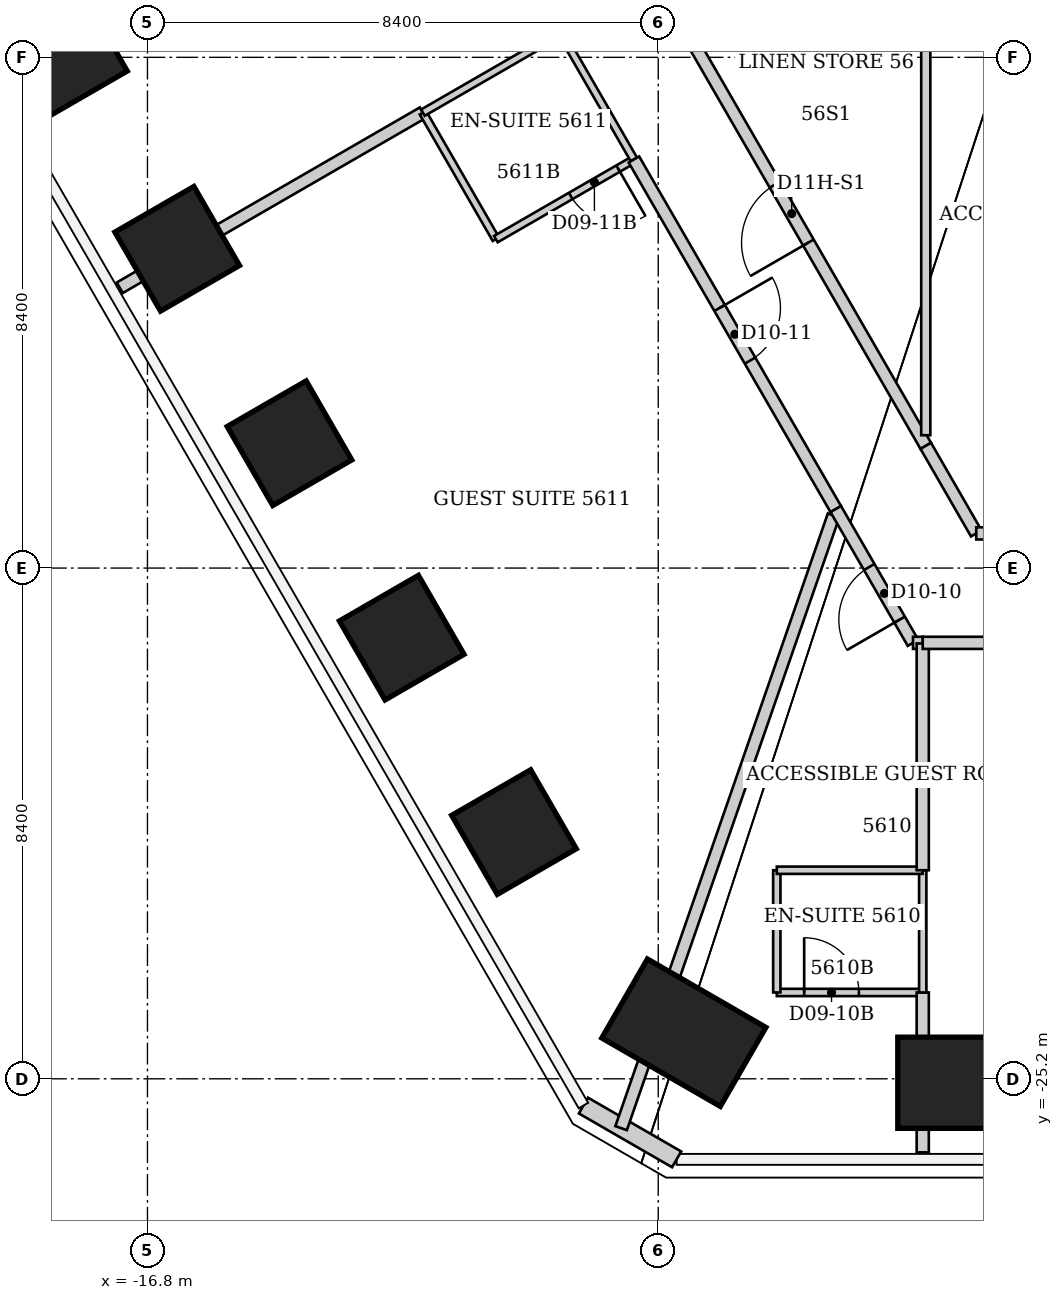
"""IFC4 building model, lengths in metres.
Left out: names, types, materials, properties, quantities, classifications, styles, units other than length and angle.
Written with IfcOpenShell. Run it as: python <this file> out.ifc"""

import sys

from ifc_helpers import new_model, si_unit, direction, frame, frame_2d, origin, origin_2d, place, context, subcontext, project, spatial, rectangle, extrude, element, fill, save


model = new_model("IFC4")
c1 = context("Model", 3, precision=1e-05, world=origin(), true_north=direction((0.0, 1.0)))
c2 = subcontext(c1, "Body", "Model", "MODEL_VIEW")
j1 = project(units=[si_unit("LENGTHUNIT", "METRE"), si_unit("PLANEANGLEUNIT", "RADIAN")], contexts=[c1])
p1 = place(None, origin())
s1 = spatial("IfcSite", under=j1, at=p1, CompositionType="ELEMENT")
p2 = place(p1, origin())
s2 = spatial("IfcBuilding", under=s1, at=p2, CompositionType="ELEMENT")
p3 = place(p2, frame((0.0, 0.0, 225.0)))
s3 = spatial("IfcBuildingStorey", under=s2, at=p3, CompositionType="ELEMENT", Elevation=225.0)
p4 = place(p3, frame((-3.71, -25.265, 0.0), z_axis=(0.0, 0.0, 1.0), x_axis=(0.0, -1.0, 0.0)))
e1 = element("IfcColumn", 1, at=p4, inside=s3, PredefinedType="COLUMN", context=c2, shape_type="SweptSolid", body=[
    extrude(rectangle(XDim=1.5, YDim=1.5, at=origin_2d()), origin(), (0.0, 0.0, 1.0), 3.8),
])
p5 = place(p3, frame((-7.979, -24.442, 0.0), z_axis=(0.0, 0.0, 1.0), x_axis=(-0.5, -0.866025403784, 0.0)))
e2 = element("IfcColumn", 2, at=p5, inside=s3, PredefinedType="COLUMN", context=c2, shape_type="SweptSolid", body=[
    extrude(rectangle(XDim=1.5, YDim=2.25, at=origin_2d()), origin(), (0.0, 0.0, 1.0), 3.8),
])
for number, where, z_axis, x_axis in (
    (3, (-10.772, -21.142, 0.0), (0.0, 0.0, 1.0), (-0.866, -0.5, 0.0)),
    (4, (-12.618, -17.945, 0.0), (0.0, 0.0, 1.0), (-0.866, -0.5, 0.0)),
    (5, (-14.465, -14.747, 0.0), (0.0, 0.0, 1.0), (-0.866, -0.5, 0.0)),
    (6, (-16.311, -11.549, 0.0), (0.0, 0.0, 1.0), (-0.866, -0.5, 0.0)),
    (7, (-18.157, -8.351, 0.0), (0.0, 0.0, 1.0), (-0.866, -0.5, 0.0)),
):
    element("IfcColumn", number, at=place(p3, frame(where, z_axis=z_axis, x_axis=x_axis)), inside=s3, PredefinedType="COLUMN", context=c2, shape_type="SweptSolid", body=[
        extrude(rectangle(XDim=1.5, YDim=1.5, at=origin_2d()), origin(), (0.0, 0.0, 1.0), 3.8),
    ])
p6 = place(p3, frame((-8.097, -26.525, 0.0), z_axis=(0.0, 0.0, 1.0), x_axis=(-0.866036293601, 0.499981137809, 0.0)))
e8 = element("IfcWall", 8, at=p6, inside=s3, PredefinedType="SOLIDWALL", context=c2, shape_type="SweptSolid", body=[
    extrude(rectangle(XDim=1.77, YDim=0.3, at=frame_2d((0.885, 0.0))), origin(), (0.0, 0.0, 1.0), 3.64),
])
p7 = place(p3, frame((-17.256, -12.19, 0.0), z_axis=(0.0, 0.0, 1.0), x_axis=(0.865937714159, 0.500151852138, 0.0)))
e9 = element("IfcWall", 9, at=p7, inside=s3, PredefinedType="PARTITIONING", context=c2, shape_type="SweptSolid", body=[
    extrude(rectangle(XDim=5.758, YDim=0.2, at=frame_2d((2.879, 0.0))), origin(), (0.0, 0.0, 1.0), 3.038),
])
p8 = place(p3, frame((-12.27, -9.31, 0.0), z_axis=(0.0, 0.0, 1.0), x_axis=(0.499737123639, -0.866177122335, 0.0)))
e10 = element("IfcWall", 10, at=p8, inside=s3, PredefinedType="PARTITIONING", context=c2, shape_type="SweptSolid", body=[
    extrude(rectangle(XDim=2.401, YDim=0.12, at=frame_2d((1.201, 0.0))), origin(), (0.0, 0.0, 1.0), 3.64),
])
p9 = place(p3, frame((-12.27, -9.31, 0.0), z_axis=(0.0, 0.0, 1.0), x_axis=(0.866114241029, 0.499846097802, 0.0)))
e11 = element("IfcWall", 11, at=p9, inside=s3, PredefinedType="PARTITIONING", context=c2, shape_type="SweptSolid", body=[
    extrude(rectangle(XDim=2.621, YDim=0.12, at=frame_2d((1.311, 0.0))), origin(), (0.0, 0.0, 1.0), 3.038),
])
p10 = place(p3, frame((-11.07, -11.39, 0.0), z_axis=(0.0, 0.0, 1.0), x_axis=(0.866154567199, 0.49977621564, 0.0)))
e12 = element("IfcWall", 12, at=p10, inside=s3, PredefinedType="PARTITIONING", context=c2, shape_type="SweptSolid", body=[
    extrude(rectangle(XDim=2.621, YDim=0.12, at=frame_2d((1.311, 0.0))), origin(), (0.0, 0.0, 1.0), 3.64),
])
p11 = place(p10, frame((1.421, 0.0, 0.0)))
e13 = element("IfcOpeningElement", 13, at=p11, cuts=e12, PredefinedType="OPENING", context=c2, shape_type="SweptSolid", body=[
    extrude(rectangle(XDim=0.9, YDim=2.03, at=frame_2d((0.45, 1.015))), frame((0.0, 0.06, 0.0), z_axis=(0.0, -1.0, 0.0), x_axis=(1.0, 0.0, 0.0)), (0.0, 0.0, 1.0), 0.12),
])
p12 = place(p3, frame((-10.0, -8.0, 0.0), z_axis=(0.0, 0.0, 1.0), x_axis=(0.499693115345, -0.866202511239, 0.0)))
e14 = element("IfcWall", 14, at=p12, inside=s3, PredefinedType="PARTITIONING", context=c2, shape_type="SweptSolid", body=[
    extrude(rectangle(XDim=2.401, YDim=0.12, at=frame_2d((1.201, 0.0))), origin(), (0.0, 0.0, 1.0), 3.64),
])
p13 = place(p3, frame((-9.01, -26.012, 0.0), z_axis=(0.0, 0.0, 1.0), x_axis=(0.327582991606, 0.944822408504, 0.0)))
e15 = element("IfcWall", 15, at=p13, inside=s3, PredefinedType="PARTITIONING", context=c2, shape_type="SweptSolid", body=[
    extrude(rectangle(XDim=10.667, YDim=0.2, at=frame_2d((5.333, 0.0))), origin(), (0.0, 0.0, 1.0), 3.64),
])
p14 = place(p3, frame((-8.8, -10.08, 0.0), z_axis=(0.0, 0.0, 1.0), x_axis=(0.500034373799, -0.866005557153, 0.0)))
e16 = element("IfcWall", 16, at=p14, inside=s3, PredefinedType="PARTITIONING", context=c2, shape_type="SweptSolid", body=[
    extrude(rectangle(XDim=6.64, YDim=0.2, at=frame_2d((3.32, 0.0))), origin(), (0.0, 0.0, 1.0), 3.64),
])
p15 = place(p14, frame((2.82, 0.0, 0.0)))
e17 = element("IfcOpeningElement", 17, at=p15, cuts=e16, PredefinedType="OPENING", context=c2, shape_type="SweptSolid", body=[
    extrude(rectangle(XDim=1.0, YDim=2.13, at=frame_2d((0.5, 1.065))), frame((0.0, 0.1, 0.0), z_axis=(0.0, -1.0, 0.0), x_axis=(1.0, 0.0, 0.0)), (0.0, 0.0, 1.0), 0.2),
])
p16 = place(p3, frame((-6.45, -23.78, 0.0), z_axis=(0.0, 0.0, 1.0), x_axis=(1.0, 0.0, 0.0)))
e18 = element("IfcWall", 18, at=p16, inside=s3, PredefinedType="PARTITIONING", context=c2, shape_type="SweptSolid", body=[
    extrude(rectangle(XDim=2.4, YDim=0.12, at=frame_2d((1.2, 0.0))), origin(), (0.0, 0.0, 1.0), 3.64),
])
p17 = place(p16, frame((0.45, 0.0, 0.0)))
e19 = element("IfcOpeningElement", 19, at=p17, cuts=e18, PredefinedType="OPENING", context=c2, shape_type="SweptSolid", body=[
    extrude(rectangle(XDim=0.9, YDim=2.03, at=frame_2d((0.45, 1.015))), frame((0.0, 0.06, 0.0), z_axis=(0.0, -1.0, 0.0), x_axis=(1.0, 0.0, 0.0)), (0.0, 0.0, 1.0), 0.12),
])
p18 = place(p3, frame((-6.45, -21.77, 0.0), z_axis=(0.0, 0.0, 1.0), x_axis=(0.0, -1.0, 0.0)))
e20 = element("IfcWall", 20, at=p18, inside=s3, PredefinedType="PARTITIONING", context=c2, shape_type="SweptSolid", body=[
    extrude(rectangle(XDim=2.01, YDim=0.12, at=frame_2d((1.005, 0.0))), origin(), (0.0, 0.0, 1.0), 3.64),
])
p19 = place(p3, frame((-5.48, -15.83, 0.0), z_axis=(0.0, 0.0, 1.0), x_axis=(0.499963722229, -0.866046347752, 0.0)))
e21 = element("IfcWall", 21, at=p19, inside=s3, PredefinedType="PARTITIONING", context=c2, shape_type="SweptSolid", body=[
    extrude(rectangle(XDim=2.54, YDim=0.2, at=frame_2d((1.27, 0.0))), origin(), (0.0, 0.0, 1.0), 3.64),
])
p20 = place(p19, frame((1.1, 0.0, 0.0)))
e22 = element("IfcOpeningElement", 22, at=p20, cuts=e21, PredefinedType="OPENING", context=c2, shape_type="SweptSolid", body=[
    extrude(rectangle(XDim=1.0, YDim=2.13, at=frame_2d((0.5, 1.065))), frame((0.0, 0.1, 0.0), z_axis=(0.0, -1.0, 0.0), x_axis=(1.0, 0.0, 0.0)), (0.0, 0.0, 1.0), 0.2),
])
p21 = place(p3, frame((-4.21, -18.03, 0.0), z_axis=(0.0, 0.0, 1.0), x_axis=(1.0, 0.0, 0.0)))
e23 = element("IfcWall", 23, at=p21, inside=s3, PredefinedType="PARTITIONING", context=c2, shape_type="SweptSolid", body=[
    extrude(rectangle(XDim=0.16, YDim=0.2, at=frame_2d((0.08, 0.0))), origin(), (0.0, 0.0, 1.0), 3.64),
])
p22 = place(p3, frame((-4.05, -26.41, 0.0), z_axis=(0.0, 0.0, 1.0), x_axis=(0.0, 1.0, 0.0)))
e24 = element("IfcWall", 24, at=p22, inside=s3, PredefinedType="PARTITIONING", context=c2, shape_type="SweptSolid", body=[
    extrude(rectangle(XDim=2.63, YDim=0.2, at=frame_2d((1.315, 0.0))), origin(), (0.0, 0.0, 1.0), 3.64),
])
p23 = place(p3, frame((-4.05, -23.78, 0.0), z_axis=(0.0, 0.0, 1.0), x_axis=(0.0, 1.0, 0.0)))
e25 = element("IfcWall", 25, at=p23, inside=s3, PredefinedType="PARTITIONING", context=c2, shape_type="SweptSolid", body=[
    extrude(rectangle(XDim=2.01, YDim=0.12, at=frame_2d((1.005, 0.0))), origin(), (0.0, 0.0, 1.0), 3.64),
])
p24 = place(p3, frame((-4.05, -21.77, 0.0), z_axis=(0.0, 0.0, 1.0), x_axis=(-1.0, 0.0, 0.0)))
e26 = element("IfcWall", 26, at=p24, inside=s3, PredefinedType="PARTITIONING", context=c2, shape_type="SweptSolid", body=[
    extrude(rectangle(XDim=2.4, YDim=0.12, at=frame_2d((1.2, 0.0))), origin(), (0.0, 0.0, 1.0), 3.64),
])
p25 = place(p3, frame((-4.05, -21.77, 0.0), z_axis=(0.0, 0.0, 1.0), x_axis=(0.0, 1.0, 0.0)))
e27 = element("IfcWall", 27, at=p25, inside=s3, PredefinedType="PARTITIONING", context=c2, shape_type="SweptSolid", body=[
    extrude(rectangle(XDim=3.73, YDim=0.2, at=frame_2d((1.865, 0.0))), origin(), (0.0, 0.0, 1.0), 3.64),
])
p26 = place(p3, frame((-4.05, -18.03, 0.0), z_axis=(0.0, 0.0, 1.0), x_axis=(1.0, 0.0, 0.0)))
e28 = element("IfcWall", 28, at=p26, inside=s3, PredefinedType="PARTITIONING", context=c2, shape_type="SweptSolid", body=[
    extrude(rectangle(XDim=8.26, YDim=0.2, at=frame_2d((4.13, 0.0))), origin(), (0.0, 0.0, 1.0), 3.64),
])
p27 = place(p26, frame((3.63, 0.0, 0.0)))
e29 = element("IfcOpeningElement", 29, at=p27, cuts=e28, PredefinedType="OPENING", context=c2, shape_type="SweptSolid", body=[
    extrude(rectangle(XDim=1.0, YDim=2.13, at=frame_2d((0.5, 1.065))), frame((0.0, 0.1, 0.0), z_axis=(0.0, -1.0, 0.0), x_axis=(1.0, 0.0, 0.0)), (0.0, 0.0, 1.0), 0.2),
])
p28 = place(p3, frame((-4.0, -14.79, 0.0), z_axis=(0.0, 0.0, 1.0), x_axis=(-0.499916512745, 0.866073599808, 0.0)))
e30 = element("IfcWall", 30, at=p28, inside=s3, PredefinedType="PARTITIONING", context=c2, shape_type="SweptSolid", body=[
    extrude(rectangle(XDim=8.821, YDim=0.2, at=frame_2d((4.411, 0.0))), origin(), (0.0, 0.0, 1.0), 3.64),
])
p29 = place(p28, frame((3.861, 0.0, 0.0)))
e31 = element("IfcOpeningElement", 31, at=p29, cuts=e30, PredefinedType="OPENING", context=c2, shape_type="SweptSolid", body=[
    extrude(rectangle(XDim=1.1, YDim=2.2, at=frame_2d((0.55, 1.1))), frame((0.0, 0.1, 0.0), z_axis=(0.0, -1.0, 0.0), x_axis=(1.0, 0.0, 0.0)), (0.0, 0.0, 1.0), 0.2),
])
p30 = place(p3, frame((-4.0, -7.1, 0.0), z_axis=(0.0, 0.0, 1.0), x_axis=(0.0, -1.0, 0.0)))
e32 = element("IfcWall", 32, at=p30, inside=s3, PredefinedType="PARTITIONING", context=c2, shape_type="SweptSolid", body=[
    extrude(rectangle(XDim=7.515, YDim=0.15, at=frame_2d((3.757, 0.0))), origin(), (0.0, 0.0, 1.0), 3.64),
])
p31 = place(p3, frame((-3.17, -16.23, 0.0), z_axis=(0.0, 0.0, 1.0), x_axis=(-0.499425709803, 0.866356716594, 0.0)))
e33 = element("IfcWall", 33, at=p31, inside=s3, PredefinedType="PARTITIONING", context=c2, shape_type="SweptSolid", body=[
    extrude(rectangle(XDim=1.662, YDim=0.2, at=frame_2d((0.831, 0.0))), origin(), (0.0, 0.0, 1.0), 3.64),
])
p32 = place(p3, frame((-1.2, -16.23, 0.0), z_axis=(0.0, 0.0, 1.0), x_axis=(-1.0, 0.0, 0.0)))
e34 = element("IfcWall", 34, at=p32, inside=s3, PredefinedType="PARTITIONING", context=c2, shape_type="SweptSolid", body=[
    extrude(rectangle(XDim=1.97, YDim=0.2, at=frame_2d((0.985, 0.0))), origin(), (0.0, 0.0, 1.0), 3.64),
])
p33 = place(p32, frame((0.435, 0.0, 0.0)))
e35 = element("IfcOpeningElement", 35, at=p33, cuts=e34, PredefinedType="OPENING", context=c2, shape_type="SweptSolid", body=[
    extrude(rectangle(XDim=1.1, YDim=2.2, at=frame_2d((0.55, 1.1))), frame((0.0, 0.1, 0.0), z_axis=(0.0, -1.0, 0.0), x_axis=(1.0, 0.0, 0.0)), (0.0, 0.0, 1.0), 0.2),
])
p34 = place(p20, origin())
e36 = element("IfcDoor", 36, at=p34, inside=s3, OperationType="SINGLE_SWING_RIGHT", PredefinedType="DOOR", context=c2, shape_type="SweptSolid", body=[
    extrude(rectangle(XDim=1.0, YDim=2.13, at=frame_2d((0.5, 1.065))), frame((0.0, 0.025, 0.0), z_axis=(0.0, -1.0, 0.0), x_axis=(1.0, 0.0, 0.0)), (0.0, 0.0, 1.0), 0.05),
])
fill(e22, e36)
p35 = place(p17, origin())
e37 = element("IfcDoor", 37, at=p35, inside=s3, OperationType="SINGLE_SWING_LEFT", PredefinedType="DOOR", context=c2, shape_type="SweptSolid", body=[
    extrude(rectangle(XDim=0.9, YDim=2.03, at=frame_2d((0.45, 1.015))), frame((0.0, 0.025, 0.0), z_axis=(0.0, -1.0, 0.0), x_axis=(1.0, 0.0, 0.0)), (0.0, 0.0, 1.0), 0.05),
])
fill(e19, e37)
p36 = place(p15, origin())
e38 = element("IfcDoor", 38, at=p36, inside=s3, OperationType="SINGLE_SWING_LEFT", PredefinedType="DOOR", context=c2, shape_type="SweptSolid", body=[
    extrude(rectangle(XDim=1.0, YDim=2.13, at=frame_2d((0.5, 1.065))), frame((0.0, 0.025, 0.0), z_axis=(0.0, -1.0, 0.0), x_axis=(1.0, 0.0, 0.0)), (0.0, 0.0, 1.0), 0.05),
])
fill(e17, e38)
p37 = place(p11, origin())
e39 = element("IfcDoor", 39, at=p37, inside=s3, OperationType="SINGLE_SWING_RIGHT", PredefinedType="DOOR", context=c2, shape_type="SweptSolid", body=[
    extrude(rectangle(XDim=0.9, YDim=2.03, at=frame_2d((0.45, 1.015))), frame((0.0, 0.025, 0.0), z_axis=(0.0, -1.0, 0.0), x_axis=(1.0, 0.0, 0.0)), (0.0, 0.0, 1.0), 0.05),
])
fill(e13, e39)
p38 = place(p29, origin())
e40 = element("IfcDoor", 40, at=p38, inside=s3, OperationType="SINGLE_SWING_LEFT", PredefinedType="DOOR", context=c2, shape_type="SweptSolid", body=[
    extrude(rectangle(XDim=1.1, YDim=2.2, at=frame_2d((0.55, 1.1))), frame((0.0, 0.025, 0.0), z_axis=(0.0, -1.0, 0.0), x_axis=(1.0, 0.0, 0.0)), (0.0, 0.0, 1.0), 0.05),
])
fill(e31, e40)
save(model, sys.argv[1])
